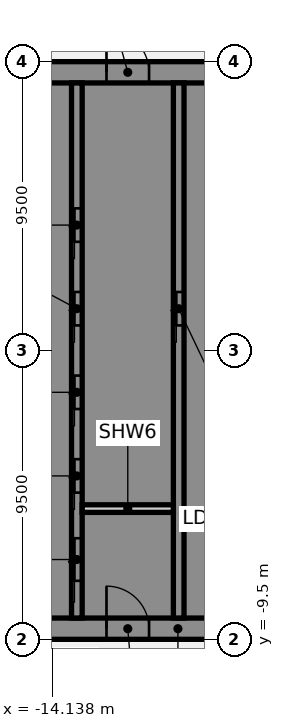
"""IFC4 building model, lengths in metres.
Left out: names, types, materials, properties, quantities, classifications, styles, units other than length and angle.
Written with IfcOpenShell. Run it as: python <this file> out.ifc"""

import sys

from ifc_helpers import new_model, si_unit, direction, frame, frame_2d, origin, place, context, subcontext, project, spatial, polyline, rectangle, outline, extrude, element, fill, save


model = new_model("IFC4")
c1 = context("Model", 3, precision=1e-05, world=origin(), true_north=direction((0.0, 1.0)))
c2 = subcontext(c1, "Body", "Model", "MODEL_VIEW")
j1 = project(units=[si_unit("LENGTHUNIT", "METRE"), si_unit("PLANEANGLEUNIT", "RADIAN")], contexts=[c1])
p1 = place(None, origin())
s1 = spatial("IfcSite", under=j1, at=p1, CompositionType="ELEMENT")
p2 = place(p1, origin())
s2 = spatial("IfcBuilding", under=s1, at=p2, CompositionType="ELEMENT")
p3 = place(p2, frame((0.0, 0.0, 29.5)))
s3 = spatial("IfcBuildingStorey", under=s2, at=p3, CompositionType="ELEMENT", Elevation=29.5)
p4 = place(p3, frame((-16.5, -9.15, 0.0), z_axis=(0.0, 0.0, 1.0), x_axis=(1.0, 0.0, 0.0)))
e1 = element("IfcWall", 1, at=p4, inside=s3, PredefinedType="SHEAR", context=c2, shape_type="SweptSolid", body=[
    extrude(rectangle(XDim=13.0, YDim=0.7, at=frame_2d((6.5, 0.0))), origin(), (0.0, 0.0, 1.0), 4.36),
])
p5 = place(p4, frame((4.15, 0.0, 0.0)))
e2 = element("IfcOpeningElement", 2, at=p5, cuts=e1, PredefinedType="OPENING", context=c2, shape_type="SweptSolid", body=[
    extrude(rectangle(XDim=1.4, YDim=2.1, at=frame_2d((0.7, 1.05))), frame((0.0, 0.36, 0.0), z_axis=(0.0, -1.0, 0.0), x_axis=(1.0, 0.0, 0.0)), (0.0, 0.0, 1.0), 0.72),
])
p6 = place(p4, frame((10.125, 0.0, 0.0)))
e3 = element("IfcOpeningElement", 3, at=p6, cuts=e1, PredefinedType="OPENING", context=c2, shape_type="SweptSolid", body=[
    extrude(rectangle(XDim=1.4, YDim=2.1, at=frame_2d((0.7, 1.05))), frame((0.0, 0.36, 0.0), z_axis=(0.0, -1.0, 0.0), x_axis=(1.0, 0.0, 0.0)), (0.0, 0.0, 1.0), 0.72),
])
p7 = place(p3, origin())
e4 = element("IfcWall", 4, at=p7, inside=s3, PredefinedType="SHEAR", context=c2, shape_type="SweptSolid", body=[
    extrude(outline(polyline([(-13.5, -8.8), (-13.5, -8.125), (-15.8, -8.125), (-15.8, -5.625), (-13.5, -5.625), (-13.5, -5.375), (-15.8, -5.375), (-15.8, -2.875), (-13.5, -2.875), (-13.5, -2.625), (-15.8, -2.625), (-15.8, -0.125), (-13.5, -0.125), (-13.5, 0.125), (-15.8, 0.125), (-15.8, 2.625), (-13.5, 2.625), (-13.5, 2.875), (-15.8, 2.875), (-15.8, 5.375), (-13.5, 5.375), (-13.5, 5.625), (-15.8, 5.625), (-15.8, 8.125), (-13.5, 8.125), (-13.5, 8.8), (-15.8, 8.8), (-16.5, 8.8), (-16.5, -8.8), (-15.8, -8.8), (-13.5, -8.8)])), origin(), (0.0, 0.0, 1.0), 4.36),
])
p8 = place(p3, frame((-16.5, 9.15, 0.0), z_axis=(0.0, 0.0, 1.0), x_axis=(1.0, 0.0, 0.0)))
e5 = element("IfcWall", 5, at=p8, inside=s3, PredefinedType="SHEAR", context=c2, shape_type="SweptSolid", body=[
    extrude(rectangle(XDim=13.0, YDim=0.7, at=frame_2d((6.5, 0.0))), origin(), (0.0, 0.0, 1.0), 4.36),
])
p9 = place(p8, frame((4.15, 0.0, 0.0)))
e6 = element("IfcOpeningElement", 6, at=p9, cuts=e5, PredefinedType="OPENING", context=c2, shape_type="SweptSolid", body=[
    extrude(rectangle(XDim=1.4, YDim=2.1, at=frame_2d((0.7, 1.05))), frame((0.0, 0.36, 0.0), z_axis=(0.0, -1.0, 0.0), x_axis=(1.0, 0.0, 0.0)), (0.0, 0.0, 1.0), 0.72),
])
p10 = place(p3, origin())
e7 = element("IfcWall", 7, at=p10, inside=s3, PredefinedType="SHEAR", context=c2, shape_type="SweptSolid", body=[
    extrude(outline(polyline([(-9.8, -5.375), (-9.8, -5.625), (-7.5, -5.625), (-7.15, -5.625), (-7.15, 8.8), (-7.5, 8.8), (-9.8, 8.8), (-9.8, 8.125), (-7.5, 8.125), (-7.5, 5.625), (-9.8, 5.625), (-9.8, 5.375), (-7.5, 5.375), (-7.5, 2.875), (-9.8, 2.875), (-9.8, 2.625), (-7.5, 2.625), (-7.5, 0.125), (-9.8, 0.125), (-9.8, -0.125), (-7.5, -0.125), (-7.5, -2.625), (-9.8, -2.625), (-9.8, -2.875), (-7.5, -2.875), (-7.5, -5.375), (-9.8, -5.375)])), origin(), (0.0, 0.0, 1.0), 4.36),
])
p11 = place(p3, origin())
e8 = element("IfcWall", 8, at=p11, inside=s3, PredefinedType="SHEAR", context=c2, shape_type="SweptSolid", body=[
    extrude(outline(polyline([(-7.5, -8.125), (-9.55, -8.125), (-9.55, -5.625), (-9.8, -5.625), (-9.8, -8.125), (-9.8, -8.8), (-7.5, -8.8), (-7.5, -8.125)])), origin(), (0.0, 0.0, 1.0), 4.36),
])
p12 = place(p3, frame((-13.325, -8.8, 0.0), z_axis=(0.0, 0.0, 1.0), x_axis=(0.0, 1.0, 0.0)))
e9 = element("IfcWall", 9, at=p12, inside=s3, PredefinedType="SHEAR", context=c2, shape_type="SweptSolid", body=[
    extrude(rectangle(XDim=17.6, YDim=0.35, at=frame_2d((8.8, 0.0))), origin(), (0.0, 0.0, 1.0), 4.36),
])
p13 = place(p12, frame((1.225, 0.0, 0.0)))
e10 = element("IfcOpeningElement", 10, at=p13, cuts=e9, PredefinedType="OPENING", context=c2, shape_type="SweptSolid", body=[
    extrude(rectangle(XDim=1.4, YDim=2.1, at=frame_2d((0.7, 1.05))), frame((0.0, 0.185, 0.0), z_axis=(0.0, -1.0, 0.0), x_axis=(1.0, 0.0, 0.0)), (0.0, 0.0, 1.0), 0.37),
])
p14 = place(p12, frame((4.125, 0.0, 0.0)))
e11 = element("IfcOpeningElement", 11, at=p14, cuts=e9, PredefinedType="OPENING", context=c2, shape_type="SweptSolid", body=[
    extrude(rectangle(XDim=1.1, YDim=2.1, at=frame_2d((0.55, 1.05))), frame((0.0, 0.185, 0.0), z_axis=(0.0, -1.0, 0.0), x_axis=(1.0, 0.0, 0.0)), (0.0, 0.0, 1.0), 0.37),
])
p15 = place(p12, frame((6.875, 0.0, 0.0)))
e12 = element("IfcOpeningElement", 12, at=p15, cuts=e9, PredefinedType="OPENING", context=c2, shape_type="SweptSolid", body=[
    extrude(rectangle(XDim=1.1, YDim=2.1, at=frame_2d((0.55, 1.05))), frame((0.0, 0.185, 0.0), z_axis=(0.0, -1.0, 0.0), x_axis=(1.0, 0.0, 0.0)), (0.0, 0.0, 1.0), 0.37),
])
p16 = place(p12, frame((9.625, 0.0, 0.0)))
e13 = element("IfcOpeningElement", 13, at=p16, cuts=e9, PredefinedType="OPENING", context=c2, shape_type="SweptSolid", body=[
    extrude(rectangle(XDim=1.1, YDim=2.1, at=frame_2d((0.55, 1.05))), frame((0.0, 0.185, 0.0), z_axis=(0.0, -1.0, 0.0), x_axis=(1.0, 0.0, 0.0)), (0.0, 0.0, 1.0), 0.37),
])
p17 = place(p12, frame((12.375, 0.0, 0.0)))
e14 = element("IfcOpeningElement", 14, at=p17, cuts=e9, PredefinedType="OPENING", context=c2, shape_type="SweptSolid", body=[
    extrude(rectangle(XDim=1.1, YDim=2.1, at=frame_2d((0.55, 1.05))), frame((0.0, 0.185, 0.0), z_axis=(0.0, -1.0, 0.0), x_axis=(1.0, 0.0, 0.0)), (0.0, 0.0, 1.0), 0.37),
])
p18 = place(p3, frame((-9.975, -8.8, 0.0), z_axis=(0.0, 0.0, 1.0), x_axis=(0.0, 1.0, 0.0)))
e15 = element("IfcWall", 15, at=p18, inside=s3, PredefinedType="SHEAR", context=c2, shape_type="SweptSolid", body=[
    extrude(rectangle(XDim=17.6, YDim=0.35, at=frame_2d((8.8, 0.0))), origin(), (0.0, 0.0, 1.0), 4.36),
])
p19 = place(p18, frame((9.625, 0.0, 0.0)))
e16 = element("IfcOpeningElement", 16, at=p19, cuts=e15, PredefinedType="OPENING", context=c2, shape_type="SweptSolid", body=[
    extrude(rectangle(XDim=1.1, YDim=2.1, at=frame_2d((0.55, 1.05))), frame((0.0, 0.185, 0.0), z_axis=(0.0, -1.0, 0.0), x_axis=(1.0, 0.0, 0.0)), (0.0, 0.0, 1.0), 0.37),
])
p20 = place(p3, frame((-13.15, -5.2, 0.0), z_axis=(0.0, 0.0, 1.0), x_axis=(1.0, 0.0, 0.0)))
e17 = element("IfcWall", 17, at=p20, inside=s3, PredefinedType="PARTITIONING", context=c2, shape_type="SweptSolid", body=[
    extrude(rectangle(XDim=3.0, YDim=0.25, at=frame_2d((1.5, 0.0))), origin(), (0.0, 0.0, 1.0), 4.36),
])
p21 = place(p5, origin())
e18 = element("IfcDoor", 18, at=p21, inside=s3, OperationType="SINGLE_SWING_LEFT", PredefinedType="DOOR", context=c2, shape_type="SweptSolid", body=[
    extrude(rectangle(XDim=1.4, YDim=2.1, at=frame_2d((0.7, 1.05))), frame((0.0, 0.025, 0.0), z_axis=(0.0, -1.0, 0.0), x_axis=(1.0, 0.0, 0.0)), (0.0, 0.0, 1.0), 0.05),
])
fill(e2, e18)
p22 = place(p13, origin())
e19 = element("IfcDoor", 19, at=p22, inside=s3, OperationType="SLIDING_TO_LEFT", PredefinedType="DOOR", context=c2, shape_type="SweptSolid", body=[
    extrude(rectangle(XDim=1.4, YDim=2.1, at=frame_2d((0.7, 1.05))), frame((0.0, 0.025, 0.0), z_axis=(0.0, -1.0, 0.0), x_axis=(1.0, 0.0, 0.0)), (0.0, 0.0, 1.0), 0.05),
])
fill(e10, e19)
p23 = place(p14, origin())
e20 = element("IfcDoor", 20, at=p23, inside=s3, OperationType="SLIDING_TO_LEFT", PredefinedType="DOOR", context=c2, shape_type="SweptSolid", body=[
    extrude(rectangle(XDim=1.1, YDim=2.1, at=frame_2d((0.55, 1.05))), frame((0.0, 0.025, 0.0), z_axis=(0.0, -1.0, 0.0), x_axis=(1.0, 0.0, 0.0)), (0.0, 0.0, 1.0), 0.05),
])
fill(e11, e20)
p24 = place(p15, origin())
e21 = element("IfcDoor", 21, at=p24, inside=s3, OperationType="SLIDING_TO_LEFT", PredefinedType="DOOR", context=c2, shape_type="SweptSolid", body=[
    extrude(rectangle(XDim=1.1, YDim=2.1, at=frame_2d((0.55, 1.05))), frame((0.0, 0.025, 0.0), z_axis=(0.0, -1.0, 0.0), x_axis=(1.0, 0.0, 0.0)), (0.0, 0.0, 1.0), 0.05),
])
fill(e12, e21)
p25 = place(p16, origin())
e22 = element("IfcDoor", 22, at=p25, inside=s3, OperationType="SLIDING_TO_LEFT", PredefinedType="DOOR", context=c2, shape_type="SweptSolid", body=[
    extrude(rectangle(XDim=1.1, YDim=2.1, at=frame_2d((0.55, 1.05))), frame((0.0, 0.025, 0.0), z_axis=(0.0, -1.0, 0.0), x_axis=(1.0, 0.0, 0.0)), (0.0, 0.0, 1.0), 0.05),
])
fill(e13, e22)
p26 = place(p17, origin())
e23 = element("IfcDoor", 23, at=p26, inside=s3, OperationType="SLIDING_TO_LEFT", PredefinedType="DOOR", context=c2, shape_type="SweptSolid", body=[
    extrude(rectangle(XDim=1.1, YDim=2.1, at=frame_2d((0.55, 1.05))), frame((0.0, 0.025, 0.0), z_axis=(0.0, -1.0, 0.0), x_axis=(1.0, 0.0, 0.0)), (0.0, 0.0, 1.0), 0.05),
])
fill(e14, e23)
p27 = place(p19, origin())
e24 = element("IfcDoor", 24, at=p27, inside=s3, OperationType="SLIDING_TO_LEFT", PredefinedType="DOOR", context=c2, shape_type="SweptSolid", body=[
    extrude(rectangle(XDim=1.1, YDim=2.1, at=frame_2d((0.55, 1.05))), frame((0.0, 0.025, 0.0), z_axis=(0.0, -1.0, 0.0), x_axis=(1.0, 0.0, 0.0)), (0.0, 0.0, 1.0), 0.05),
])
fill(e16, e24)
p28 = place(p9, origin())
e25 = element("IfcDoor", 25, at=p28, inside=s3, OperationType="SINGLE_SWING_LEFT", PredefinedType="DOOR", context=c2, shape_type="SweptSolid", body=[
    extrude(rectangle(XDim=1.4, YDim=2.1, at=frame_2d((0.7, 1.05))), frame((0.0, 0.025, 0.0), z_axis=(0.0, -1.0, 0.0), x_axis=(1.0, 0.0, 0.0)), (0.0, 0.0, 1.0), 0.05),
])
fill(e6, e25)
save(model, sys.argv[1])
